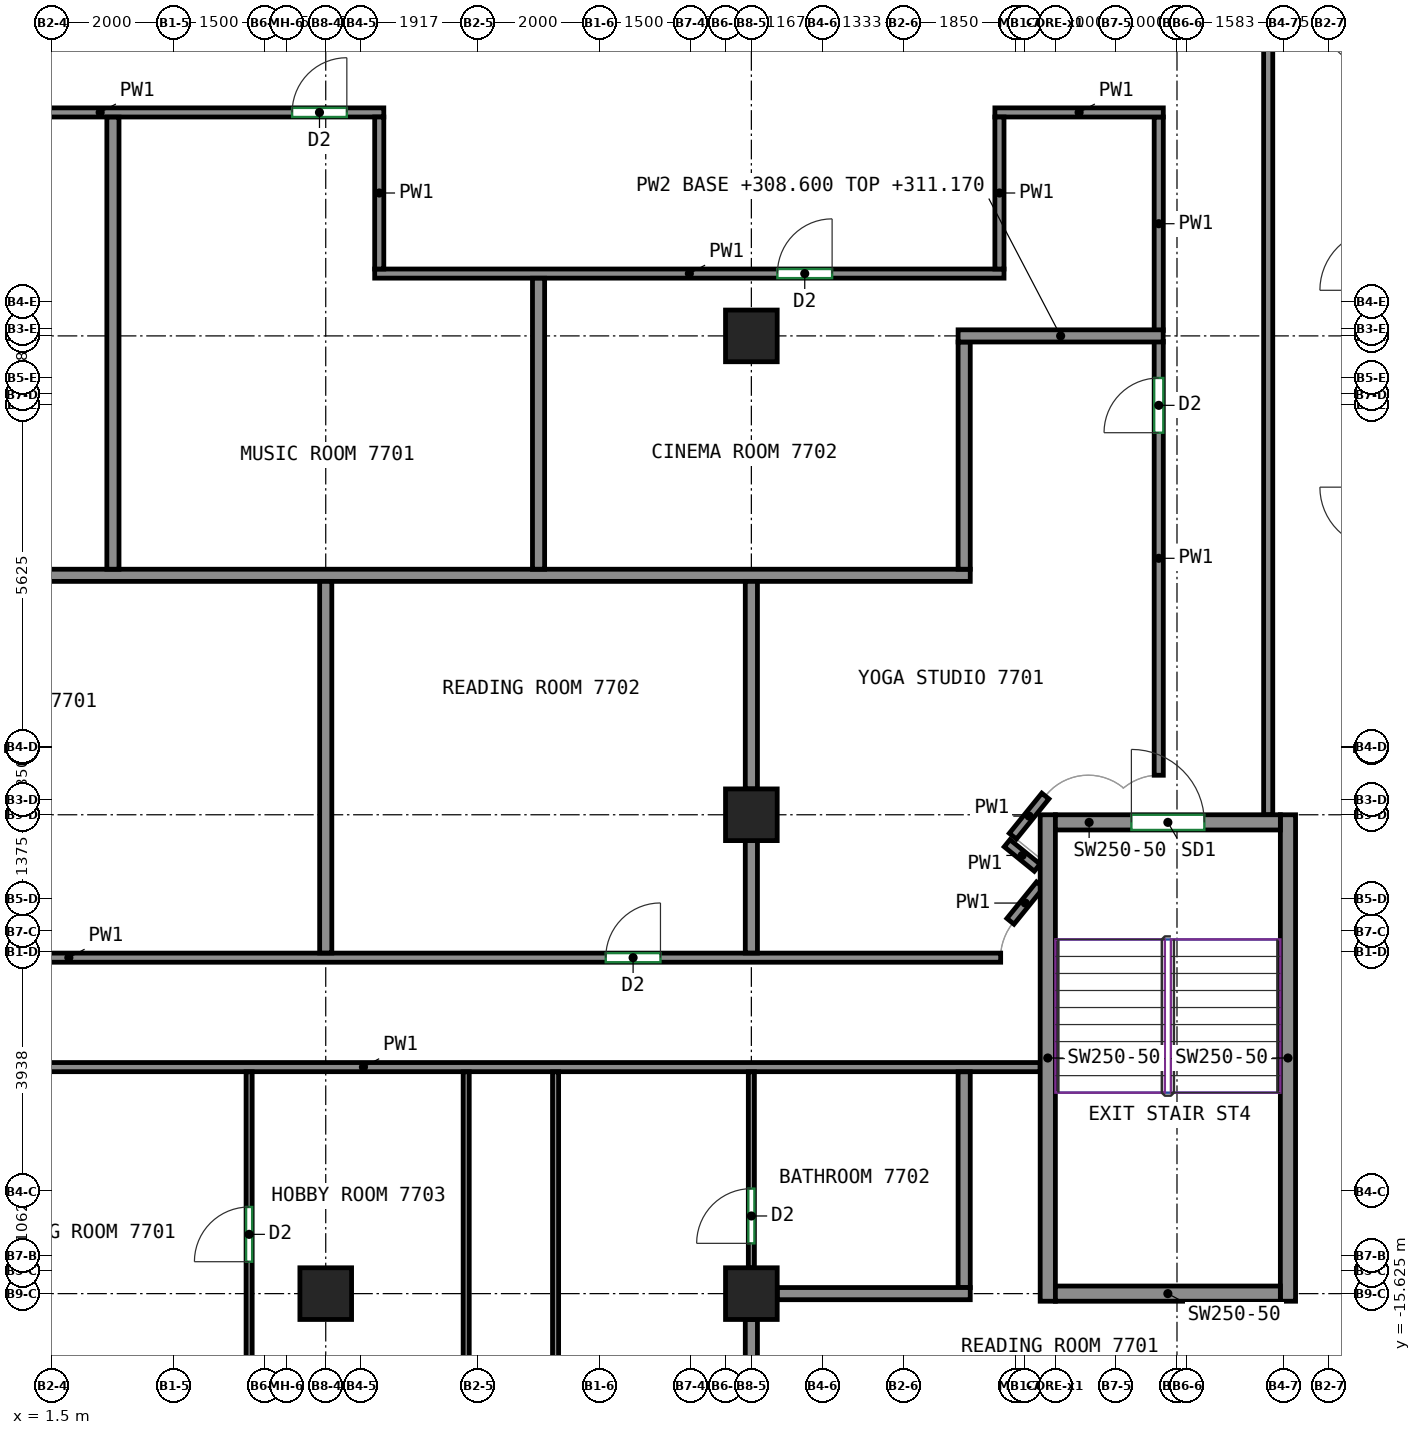
"""IFC4 building model, lengths in metres.
Left out: names, types, materials, properties, quantities, classifications, styles, units other than length and angle.
Written with IfcOpenShell. Run it as: python <this file> out.ifc"""

import sys

from ifc_helpers import new_model, si_unit, direction, frame, frame_2d, origin, origin_2d, place, context, subcontext, project, spatial, rectangle, extrude, source, transform, mapped, element, fill, save


model = new_model("IFC4")
c1 = context("Model", 3, precision=1e-05, world=origin(), true_north=direction((0.0, 1.0)))
c2 = subcontext(c1, "Body", "Model", "MODEL_VIEW")
j1 = project(units=[si_unit("LENGTHUNIT", "METRE"), si_unit("PLANEANGLEUNIT", "RADIAN")], contexts=[c1])
p1 = place(None, origin())
s1 = spatial("IfcSite", under=j1, at=p1, CompositionType="ELEMENT")
p2 = place(p1, origin())
s2 = spatial("IfcBuilding", under=s1, at=p2, CompositionType="ELEMENT")
p3 = place(p2, frame((0.0, 0.0, 308.6)))
s3 = spatial("IfcBuildingStorey", under=s2, at=p3, CompositionType="ELEMENT", Elevation=308.6)
m1 = source(origin(), c2, "Body", "SweptSolid", [
    extrude(rectangle(XDim=0.85, YDim=0.85, at=origin_2d()), origin(), (0.0, 0.0, 1.0), 3.12),
])
for number, where, z_axis, x_axis in (
    (1, (6.0, -15.625, 0.0), (0.0, 0.0, 1.0), (1.0, 0.0, 0.0)),
    (2, (13.0, -15.625, 0.0), (0.0, 0.0, 1.0), (1.0, 0.0, 0.0)),
    (3, (13.0, -7.75, 0.0), (0.0, 0.0, 1.0), (1.0, 0.0, 0.0)),
    (4, (13.0, 0.125, 0.0), (0.0, 0.0, 1.0), (1.0, 0.0, 0.0)),
):
    element("IfcColumn", number, at=place(p3, frame(where, z_axis=z_axis, x_axis=x_axis)), inside=s3, PredefinedType="COLUMN", context=c2, shape_type="MappedRepresentation", body=[
        mapped(m1, transform((0.0, 0.0, 0.0))),
    ])
m2 = source(origin(), c2, "Body", "SweptSolid", [
    extrude(rectangle(XDim=8.0, YDim=0.25, at=frame_2d((4.0, 0.0))), origin(), (0.0, 0.0, 1.0), 3.12),
])
for number, where, z_axis, x_axis in (
    (5, (17.875, -15.75, 0.0), (0.0, 0.0, 1.0), (0.0, 1.0, 0.0)),
    (6, (21.825, -15.75, 0.0), (0.0, 0.0, 1.0), (0.0, 1.0, 0.0)),
):
    element("IfcWall", number, at=place(p3, frame(where, z_axis=z_axis, x_axis=x_axis)), inside=s3, PredefinedType="SHEAR", context=c2, shape_type="MappedRepresentation", body=[
        mapped(m2, transform((0.0, 0.0, 0.0))),
    ])
m3 = source(origin(), c2, "Body", "SweptSolid", [
    extrude(rectangle(XDim=3.7, YDim=0.25, at=frame_2d((1.85, 0.0))), origin(), (0.0, 0.0, 1.0), 3.12),
])
p4 = place(p3, frame((18.0, -15.625, 0.0), z_axis=(0.0, 0.0, 1.0), x_axis=(1.0, 0.0, 0.0)))
e7 = element("IfcWall", 7, at=p4, inside=s3, PredefinedType="SHEAR", context=c2, shape_type="MappedRepresentation", body=[
    mapped(m3, transform((0.0, 0.0, 0.0))),
])
p5 = place(p3, frame((18.0, -7.875, 0.0), z_axis=(0.0, 0.0, 1.0), x_axis=(1.0, 0.0, 0.0)))
e8 = element("IfcWall", 8, at=p5, inside=s3, PredefinedType="SHEAR", context=c2, shape_type="MappedRepresentation", body=[
    mapped(m3, transform((0.0, 0.0, 0.0))),
])
p6 = place(p5, frame((1.25, 0.0, 0.0)))
e9 = element("IfcOpeningElement", 9, at=p6, cuts=e8, PredefinedType="OPENING", context=c2, shape_type="SweptSolid", body=[
    extrude(rectangle(XDim=1.2, YDim=2.1, at=frame_2d((0.6, 1.05))), frame((0.0, 0.135, 0.0), z_axis=(0.0, -1.0, 0.0), x_axis=(1.0, 0.0, 0.0)), (0.0, 0.0, 1.0), 0.27),
])
p7 = place(p3, frame((-4.51, -11.9, 0.0), z_axis=(0.0, 0.0, 1.0), x_axis=(1.0, 0.0, 0.0)))
e10 = element("IfcWall", 10, at=p7, inside=s3, PredefinedType="PARTITIONING", context=c2, shape_type="SweptSolid", body=[
    extrude(rectangle(XDim=22.26, YDim=0.15, at=frame_2d((11.13, 0.0))), origin(), (0.0, 0.0, 1.0), 3.12),
])
p8 = place(p7, frame((0.403, 0.0, 0.0)))
e11 = element("IfcOpeningElement", 11, at=p8, cuts=e10, PredefinedType="OPENING", context=c2, shape_type="SweptSolid", body=[
    extrude(rectangle(XDim=1.0, YDim=2.1, at=frame_2d((0.5, 1.05))), frame((0.0, 0.085, 0.0), z_axis=(0.0, -1.0, 0.0), x_axis=(1.0, 0.0, 0.0)), (0.0, 0.0, 1.0), 0.17),
])
p9 = place(p3, frame((21.5, -7.75, 0.0), z_axis=(0.0, 0.0, 1.0), x_axis=(0.0, 1.0, 0.0)))
e12 = element("IfcWall", 12, at=p9, inside=s3, PredefinedType="PARTITIONING", context=c2, shape_type="SweptSolid", body=[
    extrude(rectangle(XDim=29.66, YDim=0.15, at=frame_2d((14.83, 0.0))), origin(), (0.0, 0.0, 1.0), 3.12),
])
p10 = place(p9, frame((20.142, 0.0, 0.0)))
e13 = element("IfcOpeningElement", 13, at=p10, cuts=e12, PredefinedType="OPENING", context=c2, shape_type="SweptSolid", body=[
    extrude(rectangle(XDim=0.9, YDim=2.1, at=frame_2d((0.45, 1.05))), frame((0.0, 0.085, 0.0), z_axis=(0.0, -1.0, 0.0), x_axis=(1.0, 0.0, 0.0)), (0.0, 0.0, 1.0), 0.17),
])
p11 = place(p3, frame((-13.55, -10.1, 0.0), z_axis=(0.0, 0.0, 1.0), x_axis=(1.0, 0.0, 0.0)))
e14 = element("IfcWall", 14, at=p11, inside=s3, PredefinedType="PARTITIONING", context=c2, shape_type="SweptSolid", body=[
    extrude(rectangle(XDim=30.65, YDim=0.15, at=frame_2d((15.325, 0.0))), origin(), (0.0, 0.0, 1.0), 3.12),
])
p12 = place(p11, frame((6.956, 0.0, 0.0)))
e15 = element("IfcOpeningElement", 15, at=p12, cuts=e14, PredefinedType="OPENING", context=c2, shape_type="SweptSolid", body=[
    extrude(rectangle(XDim=0.9, YDim=2.1, at=frame_2d((0.45, 1.05))), frame((0.0, 0.085, 0.0), z_axis=(0.0, -1.0, 0.0), x_axis=(1.0, 0.0, 0.0)), (0.0, 0.0, 1.0), 0.17),
])
p13 = place(p11, frame((10.643, 0.0, 0.0)))
e16 = element("IfcOpeningElement", 16, at=p13, cuts=e14, PredefinedType="OPENING", context=c2, shape_type="SweptSolid", body=[
    extrude(rectangle(XDim=0.9, YDim=2.1, at=frame_2d((0.45, 1.05))), frame((0.0, 0.085, 0.0), z_axis=(0.0, -1.0, 0.0), x_axis=(1.0, 0.0, 0.0)), (0.0, 0.0, 1.0), 0.17),
])
p14 = place(p11, frame((24.155, 0.0, 0.0)))
e17 = element("IfcOpeningElement", 17, at=p14, cuts=e14, PredefinedType="OPENING", context=c2, shape_type="SweptSolid", body=[
    extrude(rectangle(XDim=0.9, YDim=2.1, at=frame_2d((0.45, 1.05))), frame((0.0, 0.085, 0.0), z_axis=(0.0, -1.0, 0.0), x_axis=(1.0, 0.0, 0.0)), (0.0, 0.0, 1.0), 0.17),
])
p15 = place(p3, frame((-2.375, 3.8, 0.0), z_axis=(0.0, 0.0, 1.0), x_axis=(1.0, 0.0, 0.0)))
e18 = element("IfcWall", 18, at=p15, inside=s3, PredefinedType="PARTITIONING", context=c2, shape_type="SweptSolid", body=[
    extrude(rectangle(XDim=9.33, YDim=0.15, at=frame_2d((4.665, 0.0))), origin(), (0.0, 0.0, 1.0), 3.12),
])
p16 = place(p15, frame((7.822, 0.0, 0.0)))
e19 = element("IfcOpeningElement", 19, at=p16, cuts=e18, PredefinedType="OPENING", context=c2, shape_type="SweptSolid", body=[
    extrude(rectangle(XDim=0.9, YDim=2.1, at=frame_2d((0.45, 1.05))), frame((0.0, 0.085, 0.0), z_axis=(0.0, -1.0, 0.0), x_axis=(1.0, 0.0, 0.0)), (0.0, 0.0, 1.0), 0.17),
])
p17 = place(p3, frame((6.805, 1.15, 0.0), z_axis=(0.0, 0.0, 1.0), x_axis=(1.0, 0.0, 0.0)))
e20 = element("IfcWall", 20, at=p17, inside=s3, PredefinedType="PARTITIONING", context=c2, shape_type="SweptSolid", body=[
    extrude(rectangle(XDim=10.35, YDim=0.15, at=frame_2d((5.175, 0.0))), origin(), (0.0, 0.0, 1.0), 3.12),
])
p18 = place(p17, frame((6.623, 0.0, 0.0)))
e21 = element("IfcOpeningElement", 21, at=p18, cuts=e20, PredefinedType="OPENING", context=c2, shape_type="SweptSolid", body=[
    extrude(rectangle(XDim=0.9, YDim=2.1, at=frame_2d((0.45, 1.05))), frame((0.0, 0.085, 0.0), z_axis=(0.0, -1.0, 0.0), x_axis=(1.0, 0.0, 0.0)), (0.0, 0.0, 1.0), 0.17),
])
p19 = place(p3, frame((6.88, 3.725, 0.0), z_axis=(0.0, 0.0, 1.0), x_axis=(0.0, -1.0, 0.0)))
e22 = element("IfcWall", 22, at=p19, inside=s3, PredefinedType="PARTITIONING", context=c2, shape_type="SweptSolid", body=[
    extrude(rectangle(XDim=2.5, YDim=0.15, at=frame_2d((1.25, 0.0))), origin(), (0.0, 0.0, 1.0), 3.12),
])
p20 = place(p3, frame((17.748, -8.902, 0.0), z_axis=(0.0, 0.0, 1.0), x_axis=(-0.630342797145, -0.776316918589, 0.0)))
e23 = element("IfcWall", 23, at=p20, inside=s3, PredefinedType="PARTITIONING", context=c2, shape_type="SweptSolid", body=[
    extrude(rectangle(XDim=0.773, YDim=0.15, at=frame_2d((0.386, 0.0))), origin(), (0.0, 0.0, 1.0), 3.12),
])
p21 = place(p3, frame((17.206, -8.218, 0.0), z_axis=(0.0, 0.0, 1.0), x_axis=(0.776102288291, -0.630607039376, 0.0)))
e24 = element("IfcWall", 24, at=p21, inside=s3, PredefinedType="PARTITIONING", context=c2, shape_type="SweptSolid", body=[
    extrude(rectangle(XDim=0.638, YDim=0.15, at=frame_2d((0.319, 0.0))), origin(), (0.0, 0.0, 1.0), 3.12),
])
p22 = place(p3, frame((17.835, -7.442, 0.0), z_axis=(0.0, 0.0, 1.0), x_axis=(-0.628859024249, -0.777519342281, 0.0)))
e25 = element("IfcWall", 25, at=p22, inside=s3, PredefinedType="PARTITIONING", context=c2, shape_type="SweptSolid", body=[
    extrude(rectangle(XDim=0.849, YDim=0.15, at=frame_2d((0.425, 0.0))), origin(), (0.0, 0.0, 1.0), 3.12),
])
p23 = place(p3, frame((19.7, -7.1, 0.0), z_axis=(0.0, 0.0, 1.0), x_axis=(0.0, 1.0, 0.0)))
e26 = element("IfcWall", 26, at=p23, inside=s3, PredefinedType="PARTITIONING", context=c2, shape_type="SweptSolid", body=[
    extrude(rectangle(XDim=7.135, YDim=0.15, at=frame_2d((3.567, 0.0))), origin(), (0.0, 0.0, 1.0), 3.12),
])
p24 = place(p23, frame((5.633, 0.0, 0.0)))
e27 = element("IfcOpeningElement", 27, at=p24, cuts=e26, PredefinedType="OPENING", context=c2, shape_type="SweptSolid", body=[
    extrude(rectangle(XDim=0.9, YDim=2.1, at=frame_2d((0.45, 1.05))), frame((0.0, 0.085, 0.0), z_axis=(0.0, -1.0, 0.0), x_axis=(1.0, 0.0, 0.0)), (0.0, 0.0, 1.0), 0.17),
])
p25 = place(p3, frame((19.7, 0.215, 0.0), z_axis=(0.0, 0.0, 1.0), x_axis=(0.0, 1.0, 0.0)))
e28 = element("IfcWall", 28, at=p25, inside=s3, PredefinedType="PARTITIONING", context=c2, shape_type="SweptSolid", body=[
    extrude(rectangle(XDim=3.51, YDim=0.15, at=frame_2d((1.755, 0.0))), origin(), (0.0, 0.0, 1.0), 3.12),
])
p26 = place(p3, frame((17.005, 3.8, 0.0), z_axis=(0.0, 0.0, 1.0), x_axis=(1.0, 0.0, 0.0)))
e29 = element("IfcWall", 29, at=p26, inside=s3, PredefinedType="PARTITIONING", context=c2, shape_type="SweptSolid", body=[
    extrude(rectangle(XDim=2.77, YDim=0.15, at=frame_2d((1.385, 0.0))), origin(), (0.0, 0.0, 1.0), 3.12),
])
p27 = place(p3, frame((17.08, 1.225, 0.0), z_axis=(0.0, 0.0, 1.0), x_axis=(0.0, 1.0, 0.0)))
e30 = element("IfcWall", 30, at=p27, inside=s3, PredefinedType="PARTITIONING", context=c2, shape_type="SweptSolid", body=[
    extrude(rectangle(XDim=2.5, YDim=0.15, at=frame_2d((1.25, 0.0))), origin(), (0.0, 0.0, 1.0), 3.12),
])
p28 = place(p3, frame((4.74, -17.526, 0.0), z_axis=(0.0, 0.0, 1.0), x_axis=(0.0, 1.0, 0.0)))
e31 = element("IfcWall", 31, at=p28, inside=s3, PredefinedType="PARTITIONING", context=c2, shape_type="SweptSolid", body=[
    extrude(rectangle(XDim=5.549, YDim=0.1, at=frame_2d((2.774, 0.0))), origin(), (0.0, 0.0, 1.0), 3.12),
])
p29 = place(p28, frame((2.426, 0.0, 0.0)))
e32 = element("IfcOpeningElement", 32, at=p29, cuts=e31, PredefinedType="OPENING", context=c2, shape_type="SweptSolid", body=[
    extrude(rectangle(XDim=0.9, YDim=2.1, at=frame_2d((0.45, 1.05))), frame((0.0, 0.06, 0.0), z_axis=(0.0, -1.0, 0.0), x_axis=(1.0, 0.0, 0.0)), (0.0, 0.0, 1.0), 0.12),
])
p30 = place(p3, frame((8.31, -17.526, 0.0), z_axis=(0.0, 0.0, 1.0), x_axis=(0.0, 1.0, 0.0)))
e33 = element("IfcWall", 33, at=p30, inside=s3, PredefinedType="PARTITIONING", context=c2, shape_type="SweptSolid", body=[
    extrude(rectangle(XDim=5.549, YDim=0.1, at=frame_2d((2.774, 0.0))), origin(), (0.0, 0.0, 1.0), 3.12),
])
p31 = place(p3, frame((9.78, -23.25, 0.0), z_axis=(0.0, 0.0, 1.0), x_axis=(0.0, 1.0, 0.0)))
e34 = element("IfcWall", 34, at=p31, inside=s3, PredefinedType="PARTITIONING", context=c2, shape_type="SweptSolid", body=[
    extrude(rectangle(XDim=11.273, YDim=0.1, at=frame_2d((5.636, 0.0))), origin(), (0.0, 0.0, 1.0), 3.12),
])
p32 = place(p31, frame((3.625, 0.0, 0.0)))
e35 = element("IfcOpeningElement", 35, at=p32, cuts=e34, PredefinedType="OPENING", context=c2, shape_type="SweptSolid", body=[
    extrude(rectangle(XDim=1.0, YDim=2.1, at=frame_2d((0.5, 1.05))), frame((0.0, 0.06, 0.0), z_axis=(0.0, -1.0, 0.0), x_axis=(1.0, 0.0, 0.0)), (0.0, 0.0, 1.0), 0.12),
])
p33 = place(p3, frame((13.0, -15.2, 0.0), z_axis=(0.0, 0.0, 1.0), x_axis=(0.0, 1.0, 0.0)))
e36 = element("IfcWall", 36, at=p33, inside=s3, PredefinedType="PARTITIONING", context=c2, shape_type="SweptSolid", body=[
    extrude(rectangle(XDim=3.223, YDim=0.1, at=frame_2d((1.611, 0.0))), origin(), (0.0, 0.0, 1.0), 3.12),
])
p34 = place(p33, frame((0.402, 0.0, 0.0)))
e37 = element("IfcOpeningElement", 37, at=p34, cuts=e36, PredefinedType="OPENING", context=c2, shape_type="SweptSolid", body=[
    extrude(rectangle(XDim=0.9, YDim=2.1, at=frame_2d((0.45, 1.05))), frame((0.0, 0.06, 0.0), z_axis=(0.0, -1.0, 0.0), x_axis=(1.0, 0.0, 0.0)), (0.0, 0.0, 1.0), 0.12),
])
p35 = place(p3, frame((13.0, -22.75, 0.0), z_axis=(0.0, 0.0, 1.0), x_axis=(0.0, 1.0, 0.0)))
e38 = element("IfcWall", 38, at=p35, inside=s3, PredefinedType="PARTITIONING", context=c2, shape_type="SweptSolid", body=[
    extrude(rectangle(XDim=6.7, YDim=0.2, at=frame_2d((3.35, 0.0))), origin(), (0.0, 0.0, 1.0), 3.12),
])
p36 = place(p3, frame((16.5, -15.525, 0.0), z_axis=(0.0, 0.0, 1.0), x_axis=(0.0, 1.0, 0.0)))
e39 = element("IfcWall", 39, at=p36, inside=s3, PredefinedType="PARTITIONING", context=c2, shape_type="SweptSolid", body=[
    extrude(rectangle(XDim=3.548, YDim=0.2, at=frame_2d((1.774, 0.0))), origin(), (0.0, 0.0, 1.0), 3.12),
])
p37 = place(p3, frame((13.425, -15.625, 0.0), z_axis=(0.0, 0.0, 1.0), x_axis=(1.0, 0.0, 0.0)))
e40 = element("IfcWall", 40, at=p37, inside=s3, PredefinedType="PARTITIONING", context=c2, shape_type="SweptSolid", body=[
    extrude(rectangle(XDim=3.175, YDim=0.2, at=frame_2d((1.587, 0.0))), origin(), (0.0, 0.0, 1.0), 3.12),
])
p38 = place(p3, frame((-11.6, -3.812, 0.0), z_axis=(0.0, 0.0, 1.0), x_axis=(1.0, 0.0, 0.0)))
e41 = element("IfcWall", 41, at=p38, inside=s3, PredefinedType="PARTITIONING", context=c2, shape_type="SweptSolid", body=[
    extrude(rectangle(XDim=28.2, YDim=0.2, at=frame_2d((14.1, 0.0))), origin(), (0.0, 0.0, 1.0), 3.12),
])
p39 = place(p3, frame((2.5, -3.712, 0.0), z_axis=(0.0, 0.0, 1.0), x_axis=(0.0, 1.0, 0.0)))
e42 = element("IfcWall", 42, at=p39, inside=s3, PredefinedType="PARTITIONING", context=c2, shape_type="SweptSolid", body=[
    extrude(rectangle(XDim=7.435, YDim=0.2, at=frame_2d((3.717, 0.0))), origin(), (0.0, 0.0, 1.0), 3.12),
])
p40 = place(p3, frame((6.0, -10.023, 0.0), z_axis=(0.0, 0.0, 1.0), x_axis=(0.0, 1.0, 0.0)))
e43 = element("IfcWall", 43, at=p40, inside=s3, PredefinedType="PARTITIONING", context=c2, shape_type="SweptSolid", body=[
    extrude(rectangle(XDim=6.111, YDim=0.2, at=frame_2d((3.055, 0.0))), origin(), (0.0, 0.0, 1.0), 3.12),
])
p41 = place(p3, frame((9.5, -3.712, 0.0), z_axis=(0.0, 0.0, 1.0), x_axis=(0.0, 1.0, 0.0)))
e44 = element("IfcWall", 44, at=p41, inside=s3, PredefinedType="PARTITIONING", context=c2, shape_type="SweptSolid", body=[
    extrude(rectangle(XDim=4.785, YDim=0.2, at=frame_2d((2.393, 0.0))), origin(), (0.0, 0.0, 1.0), 3.12),
])
p42 = place(p3, frame((13.0, -7.325, 0.0), z_axis=(0.0, 0.0, 1.0), x_axis=(0.0, 1.0, 0.0)))
e45 = element("IfcWall", 45, at=p42, inside=s3, PredefinedType="PARTITIONING", context=c2, shape_type="SweptSolid", body=[
    extrude(rectangle(XDim=3.413, YDim=0.2, at=frame_2d((1.707, 0.0))), origin(), (0.0, 0.0, 1.0), 3.12),
])
p43 = place(p3, frame((13.0, -10.023, 0.0), z_axis=(0.0, 0.0, 1.0), x_axis=(0.0, 1.0, 0.0)))
e46 = element("IfcWall", 46, at=p43, inside=s3, PredefinedType="PARTITIONING", context=c2, shape_type="SweptSolid", body=[
    extrude(rectangle(XDim=1.848, YDim=0.2, at=frame_2d((0.924, 0.0))), origin(), (0.0, 0.0, 1.0), 3.12),
])
p44 = place(p3, frame((16.5, -3.712, 0.0), z_axis=(0.0, 0.0, 1.0), x_axis=(0.0, 1.0, 0.0)))
e47 = element("IfcWall", 47, at=p44, inside=s3, PredefinedType="PARTITIONING", context=c2, shape_type="SweptSolid", body=[
    extrude(rectangle(XDim=3.737, YDim=0.2, at=frame_2d((1.868, 0.0))), origin(), (0.0, 0.0, 1.0), 3.12),
])
p45 = place(p3, frame((19.773, 0.125, 0.0), z_axis=(0.0, 0.0, 1.0), x_axis=(-1.0, 0.0, 0.0)))
e48 = element("IfcWall", 48, at=p45, inside=s3, PredefinedType="PARTITIONING", context=c2, shape_type="SweptSolid", body=[
    extrude(rectangle(XDim=3.373, YDim=0.2, at=frame_2d((1.687, 0.0))), origin(), (0.0, 0.0, 1.0), 2.57),
])
p46 = place(p6, origin())
e49 = element("IfcDoor", 49, at=p46, inside=s3, OperationType="DOUBLE_DOOR_SINGLE_SWING", PredefinedType="DOOR", context=c2, shape_type="SweptSolid", body=[
    extrude(rectangle(XDim=1.2, YDim=2.1, at=frame_2d((0.6, 1.05))), frame((0.0, 0.025, 0.0), z_axis=(0.0, -1.0, 0.0), x_axis=(1.0, 0.0, 0.0)), (0.0, 0.0, 1.0), 0.05),
])
fill(e9, e49)
p47 = place(p29, origin())
e50 = element("IfcDoor", 50, at=p47, inside=s3, OperationType="SINGLE_SWING_LEFT", PredefinedType="DOOR", context=c2, shape_type="SweptSolid", body=[
    extrude(rectangle(XDim=0.9, YDim=2.1, at=frame_2d((0.45, 1.05))), frame((0.0, 0.025, 0.0), z_axis=(0.0, -1.0, 0.0), x_axis=(1.0, 0.0, 0.0)), (0.0, 0.0, 1.0), 0.05),
])
fill(e32, e50)
p48 = place(p34, origin())
e51 = element("IfcDoor", 51, at=p48, inside=s3, OperationType="SINGLE_SWING_LEFT", PredefinedType="DOOR", context=c2, shape_type="SweptSolid", body=[
    extrude(rectangle(XDim=0.9, YDim=2.1, at=frame_2d((0.45, 1.05))), frame((0.0, 0.025, 0.0), z_axis=(0.0, -1.0, 0.0), x_axis=(1.0, 0.0, 0.0)), (0.0, 0.0, 1.0), 0.05),
])
fill(e37, e51)
p49 = place(p14, origin())
e52 = element("IfcDoor", 52, at=p49, inside=s3, OperationType="SINGLE_SWING_RIGHT", PredefinedType="DOOR", context=c2, shape_type="SweptSolid", body=[
    extrude(rectangle(XDim=0.9, YDim=2.1, at=frame_2d((0.45, 1.05))), frame((0.0, 0.025, 0.0), z_axis=(0.0, -1.0, 0.0), x_axis=(1.0, 0.0, 0.0)), (0.0, 0.0, 1.0), 0.05),
])
fill(e17, e52)
p50 = place(p24, origin())
e53 = element("IfcDoor", 53, at=p50, inside=s3, OperationType="SINGLE_SWING_LEFT", PredefinedType="DOOR", context=c2, shape_type="SweptSolid", body=[
    extrude(rectangle(XDim=0.9, YDim=2.1, at=frame_2d((0.45, 1.05))), frame((0.0, 0.025, 0.0), z_axis=(0.0, -1.0, 0.0), x_axis=(1.0, 0.0, 0.0)), (0.0, 0.0, 1.0), 0.05),
])
fill(e27, e53)
p51 = place(p18, origin())
e54 = element("IfcDoor", 54, at=p51, inside=s3, OperationType="SINGLE_SWING_RIGHT", PredefinedType="DOOR", context=c2, shape_type="SweptSolid", body=[
    extrude(rectangle(XDim=0.9, YDim=2.1, at=frame_2d((0.45, 1.05))), frame((0.0, 0.025, 0.0), z_axis=(0.0, -1.0, 0.0), x_axis=(1.0, 0.0, 0.0)), (0.0, 0.0, 1.0), 0.05),
])
fill(e21, e54)
p52 = place(p16, origin())
e55 = element("IfcDoor", 55, at=p52, inside=s3, OperationType="SINGLE_SWING_RIGHT", PredefinedType="DOOR", context=c2, shape_type="SweptSolid", body=[
    extrude(rectangle(XDim=0.9, YDim=2.1, at=frame_2d((0.45, 1.05))), frame((0.0, 0.025, 0.0), z_axis=(0.0, -1.0, 0.0), x_axis=(1.0, 0.0, 0.0)), (0.0, 0.0, 1.0), 0.05),
])
fill(e19, e55)
save(model, sys.argv[1])
